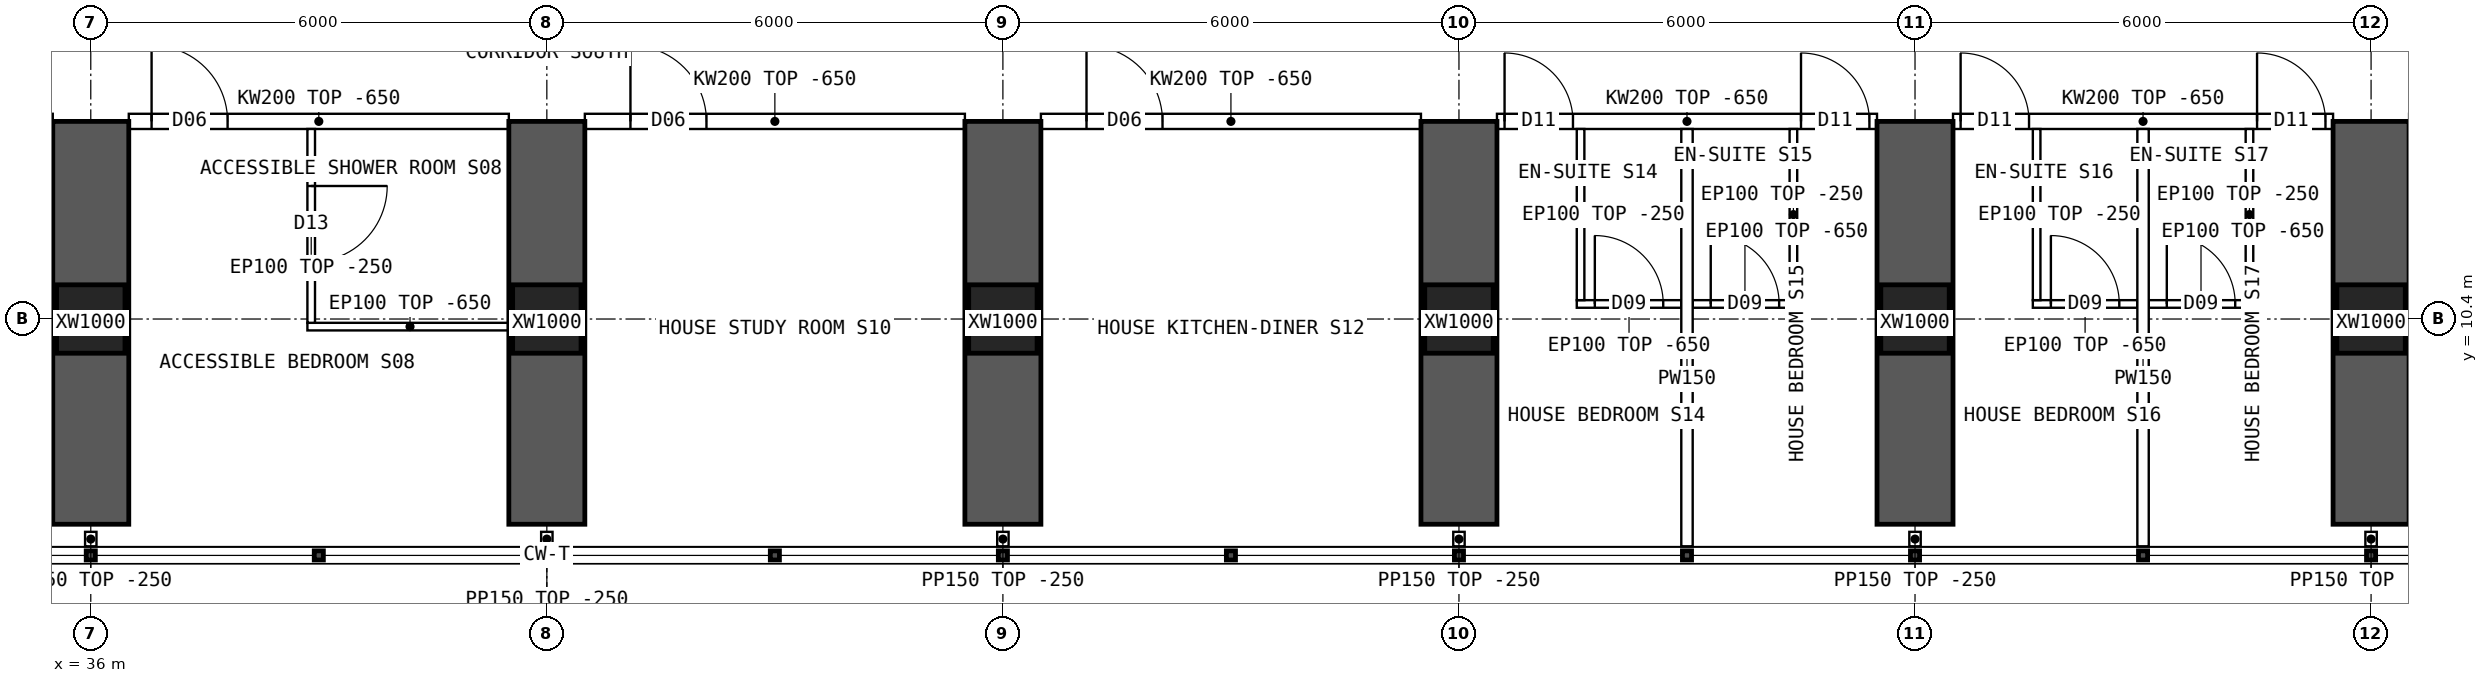
"""IFC4 building model, lengths in metres.
Left out: names, types, materials, properties, quantities, classifications, styles, units other than length and angle.
Written with IfcOpenShell. Run it as: python <this file> out.ifc"""

import sys

from ifc_helpers import new_model, si_unit, direction, frame, frame_2d, origin, origin_2d, place, context, subcontext, project, spatial, polyline, rectangle, hollow_rectangle, outline, extrude, element, fill, save


model = new_model("IFC4")
c1 = context("Model", 3, precision=1e-05, world=origin(), true_north=direction((0.0, 1.0)))
c2 = subcontext(c1, "Body", "Model", "MODEL_VIEW")
j1 = project(units=[si_unit("LENGTHUNIT", "METRE"), si_unit("PLANEANGLEUNIT", "RADIAN")], contexts=[c1])
p1 = place(None, origin())
s1 = spatial("IfcSite", under=j1, at=p1, CompositionType="ELEMENT")
p2 = place(p1, origin())
s2 = spatial("IfcBuilding", under=s1, at=p2, CompositionType="ELEMENT")
p3 = place(p2, frame((0.0, 0.0, 38.95)))
s3 = spatial("IfcBuildingStorey", under=s2, at=p3, CompositionType="ELEMENT", Elevation=38.95)
for number, where, z_axis, x_axis in (
    (1, (36.0, 10.4, 0.0), (0.0, 0.0, 1.0), (1.0, 0.0, 0.0)),
    (2, (42.0, 10.4, 0.0), (0.0, 0.0, 1.0), (1.0, 0.0, 0.0)),
    (3, (48.0, 10.4, 0.0), (0.0, 0.0, 1.0), (1.0, 0.0, 0.0)),
    (4, (54.0, 10.4, 0.0), (0.0, 0.0, 1.0), (1.0, 0.0, 0.0)),
    (5, (60.0, 10.4, 0.0), (0.0, 0.0, 1.0), (1.0, 0.0, 0.0)),
    (6, (66.0, 10.4, 0.0), (0.0, 0.0, 1.0), (1.0, 0.0, 0.0)),
):
    element("IfcColumn", number, at=place(p3, frame(where, z_axis=z_axis, x_axis=x_axis)), inside=s3, PredefinedType="COLUMN", context=c2, shape_type="SweptSolid", body=[
        extrude(hollow_rectangle(XDim=0.9, YDim=0.9, WallThickness=0.09, at=origin_2d()), origin(), (0.0, 0.0, 1.0), 3.75),
    ])
for number, where, z_axis, x_axis in (
    (7, (36.0, 7.7, 0.0), (0.0, 0.0, 1.0), (0.0, 1.0, 0.0)),
    (8, (42.0, 7.7, 0.0), (0.0, 0.0, 1.0), (0.0, 1.0, 0.0)),
    (9, (48.0, 7.7, 0.0), (0.0, 0.0, 1.0), (0.0, 1.0, 0.0)),
    (10, (54.0, 7.7, 0.0), (0.0, 0.0, 1.0), (0.0, 1.0, 0.0)),
    (11, (60.0, 7.7, 0.0), (0.0, 0.0, 1.0), (0.0, 1.0, 0.0)),
    (12, (66.0, 7.7, 0.0), (0.0, 0.0, 1.0), (0.0, 1.0, 0.0)),
):
    element("IfcWall", number, at=place(p3, frame(where, z_axis=z_axis, x_axis=x_axis)), inside=s3, PredefinedType="SHEAR", context=c2, shape_type="SweptSolid", body=[
        extrude(rectangle(XDim=5.3, YDim=1.0, at=frame_2d((2.65, 0.0))), origin(), (0.0, 0.0, 1.0), 3.75),
    ])
p4 = place(p3, frame((36.5, 13.0, 0.0), z_axis=(0.0, 0.0, 1.0), x_axis=(1.0, 0.0, 0.0)))
e13 = element("IfcWall", 13, at=p4, inside=s3, PredefinedType="SOLIDWALL", context=c2, shape_type="SweptSolid", body=[
    extrude(outline(polyline([(0.0, 0.0), (5.0, 0.0), (5.0, 3.1), (0.0, 3.1), (0.0, 0.0)])), frame((0.0, 0.1, 0.0), z_axis=(0.0, -1.0, 0.0), x_axis=(1.0, 0.0, 0.0)), (0.0, 0.0, 1.0), 0.2),
])
p5 = place(p4, frame((0.3, 0.0, 0.0)))
e14 = element("IfcOpeningElement", 14, at=p5, cuts=e13, PredefinedType="OPENING", context=c2, shape_type="SweptSolid", body=[
    extrude(rectangle(XDim=1.0, YDim=2.1, at=frame_2d((0.5, 1.05))), frame((0.0, 0.11, 0.0), z_axis=(0.0, -1.0, 0.0), x_axis=(1.0, 0.0, 0.0)), (0.0, 0.0, 1.0), 0.22),
])
p6 = place(p3, frame((42.5, 13.0, 0.0), z_axis=(0.0, 0.0, 1.0), x_axis=(1.0, 0.0, 0.0)))
e15 = element("IfcWall", 15, at=p6, inside=s3, PredefinedType="SOLIDWALL", context=c2, shape_type="SweptSolid", body=[
    extrude(outline(polyline([(0.0, 0.0), (5.0, 0.0), (5.0, 3.1), (0.0, 3.1), (0.0, 0.0)])), frame((0.0, 0.1, 0.0), z_axis=(0.0, -1.0, 0.0), x_axis=(1.0, 0.0, 0.0)), (0.0, 0.0, 1.0), 0.2),
])
p7 = place(p6, frame((0.6, 0.0, 0.0)))
e16 = element("IfcOpeningElement", 16, at=p7, cuts=e15, PredefinedType="OPENING", context=c2, shape_type="SweptSolid", body=[
    extrude(rectangle(XDim=1.0, YDim=2.1, at=frame_2d((0.5, 1.05))), frame((0.0, 0.11, 0.0), z_axis=(0.0, -1.0, 0.0), x_axis=(1.0, 0.0, 0.0)), (0.0, 0.0, 1.0), 0.22),
])
p8 = place(p3, frame((48.5, 13.0, 0.0), z_axis=(0.0, 0.0, 1.0), x_axis=(1.0, 0.0, 0.0)))
e17 = element("IfcWall", 17, at=p8, inside=s3, PredefinedType="SOLIDWALL", context=c2, shape_type="SweptSolid", body=[
    extrude(outline(polyline([(0.0, 0.0), (5.0, 0.0), (5.0, 3.1), (0.0, 3.1), (0.0, 0.0)])), frame((0.0, 0.1, 0.0), z_axis=(0.0, -1.0, 0.0), x_axis=(1.0, 0.0, 0.0)), (0.0, 0.0, 1.0), 0.2),
])
p9 = place(p8, frame((0.6, 0.0, 0.0)))
e18 = element("IfcOpeningElement", 18, at=p9, cuts=e17, PredefinedType="OPENING", context=c2, shape_type="SweptSolid", body=[
    extrude(rectangle(XDim=1.0, YDim=2.1, at=frame_2d((0.5, 1.05))), frame((0.0, 0.11, 0.0), z_axis=(0.0, -1.0, 0.0), x_axis=(1.0, 0.0, 0.0)), (0.0, 0.0, 1.0), 0.22),
])
p10 = place(p3, frame((54.5, 13.0, 0.0), z_axis=(0.0, 0.0, 1.0), x_axis=(1.0, 0.0, 0.0)))
e19 = element("IfcWall", 19, at=p10, inside=s3, PredefinedType="SOLIDWALL", context=c2, shape_type="SweptSolid", body=[
    extrude(outline(polyline([(0.0, 0.0), (5.0, 0.0), (5.0, 3.1), (0.0, 3.1), (0.0, 0.0)])), frame((0.0, 0.1, 0.0), z_axis=(0.0, -1.0, 0.0), x_axis=(1.0, 0.0, 0.0)), (0.0, 0.0, 1.0), 0.2),
])
p11 = place(p10, frame((0.1, 0.0, 0.0)))
e20 = element("IfcOpeningElement", 20, at=p11, cuts=e19, PredefinedType="OPENING", context=c2, shape_type="SweptSolid", body=[
    extrude(rectangle(XDim=0.9, YDim=2.1, at=frame_2d((0.45, 1.05))), frame((0.0, 0.11, 0.0), z_axis=(0.0, -1.0, 0.0), x_axis=(1.0, 0.0, 0.0)), (0.0, 0.0, 1.0), 0.22),
])
p12 = place(p10, frame((4.0, 0.0, 0.0)))
e21 = element("IfcOpeningElement", 21, at=p12, cuts=e19, PredefinedType="OPENING", context=c2, shape_type="SweptSolid", body=[
    extrude(rectangle(XDim=0.9, YDim=2.1, at=frame_2d((0.45, 1.05))), frame((0.0, 0.11, 0.0), z_axis=(0.0, -1.0, 0.0), x_axis=(1.0, 0.0, 0.0)), (0.0, 0.0, 1.0), 0.22),
])
p13 = place(p3, frame((60.5, 13.0, 0.0), z_axis=(0.0, 0.0, 1.0), x_axis=(1.0, 0.0, 0.0)))
e22 = element("IfcWall", 22, at=p13, inside=s3, PredefinedType="SOLIDWALL", context=c2, shape_type="SweptSolid", body=[
    extrude(outline(polyline([(0.0, 0.0), (5.0, 0.0), (5.0, 3.1), (0.0, 3.1), (0.0, 0.0)])), frame((0.0, 0.1, 0.0), z_axis=(0.0, -1.0, 0.0), x_axis=(1.0, 0.0, 0.0)), (0.0, 0.0, 1.0), 0.2),
])
p14 = place(p13, frame((0.1, 0.0, 0.0)))
e23 = element("IfcOpeningElement", 23, at=p14, cuts=e22, PredefinedType="OPENING", context=c2, shape_type="SweptSolid", body=[
    extrude(rectangle(XDim=0.9, YDim=2.1, at=frame_2d((0.45, 1.05))), frame((0.0, 0.11, 0.0), z_axis=(0.0, -1.0, 0.0), x_axis=(1.0, 0.0, 0.0)), (0.0, 0.0, 1.0), 0.22),
])
p15 = place(p13, frame((4.0, 0.0, 0.0)))
e24 = element("IfcOpeningElement", 24, at=p15, cuts=e22, PredefinedType="OPENING", context=c2, shape_type="SweptSolid", body=[
    extrude(rectangle(XDim=0.9, YDim=2.1, at=frame_2d((0.45, 1.05))), frame((0.0, 0.11, 0.0), z_axis=(0.0, -1.0, 0.0), x_axis=(1.0, 0.0, 0.0)), (0.0, 0.0, 1.0), 0.22),
])
p16 = place(p3, frame((38.85, 10.3, 0.0), z_axis=(0.0, 0.0, 1.0), x_axis=(1.0, 0.0, 0.0)))
e25 = element("IfcWall", 25, at=p16, inside=s3, PredefinedType="PARTITIONING", context=c2, shape_type="SweptSolid", body=[
    extrude(outline(polyline([(0.0, 0.0), (2.7, 0.0), (2.7, 3.1), (0.0, 3.1), (0.0, 0.0)])), frame((0.0, 0.05, 0.0), z_axis=(0.0, -1.0, 0.0), x_axis=(1.0, 0.0, 0.0)), (0.0, 0.0, 1.0), 0.1),
])
p17 = place(p3, frame((38.9, 10.35, 0.0), z_axis=(0.0, 0.0, 1.0), x_axis=(0.0, 1.0, 0.0)))
e26 = element("IfcWall", 26, at=p17, inside=s3, PredefinedType="PARTITIONING", context=c2, shape_type="SweptSolid", body=[
    extrude(outline(polyline([(0.0, 0.0), (2.55, 0.0), (2.55, 3.1), (2.502, 3.1), (2.5, 3.5), (0.252, 3.5), (0.25, 3.1), (0.0, 3.1), (0.0, 0.0)])), frame((0.0, 0.05, 0.0), z_axis=(0.0, -1.0, 0.0), x_axis=(1.0, 0.0, 0.0)), (0.0, 0.0, 1.0), 0.1),
])
p18 = place(p17, frame((0.8, 0.0, 0.0)))
e27 = element("IfcOpeningElement", 27, at=p18, cuts=e26, PredefinedType="OPENING", context=c2, shape_type="SweptSolid", body=[
    extrude(rectangle(XDim=1.0, YDim=2.1, at=frame_2d((0.5, 1.05))), frame((0.0, 0.06, 0.0), z_axis=(0.0, -1.0, 0.0), x_axis=(1.0, 0.0, 0.0)), (0.0, 0.0, 1.0), 0.12),
])
p19 = place(p3, frame((57.0, 7.41, 0.0), z_axis=(0.0, 0.0, 1.0), x_axis=(0.0, 1.0, 0.0)))
e28 = element("IfcWall", 28, at=p19, inside=s3, PredefinedType="PARTITIONING", context=c2, shape_type="SweptSolid", body=[
    extrude(outline(polyline([(0.0, 0.0), (5.49, 0.0), (5.49, 3.1), (5.442, 3.1), (5.44, 3.5), (3.192, 3.5), (3.19, 3.1), (2.792, 3.1), (2.79, 3.5), (0.0, 3.5), (0.0, 0.0)])), frame((0.0, 0.075, 0.0), z_axis=(0.0, -1.0, 0.0), x_axis=(1.0, 0.0, 0.0)), (0.0, 0.0, 1.0), 0.15),
])
p20 = place(p3, frame((56.925, 10.598, 0.0), z_axis=(0.0, 0.0, 1.0), x_axis=(-1.0, 0.0, 0.0)))
e29 = element("IfcWall", 29, at=p20, inside=s3, PredefinedType="PARTITIONING", context=c2, shape_type="SweptSolid", body=[
    extrude(outline(polyline([(0.0, 0.0), (1.375, 0.0), (1.375, 3.1), (0.0, 3.1), (0.0, 0.0)])), frame((0.0, 0.05, 0.0), z_axis=(0.0, -1.0, 0.0), x_axis=(1.0, 0.0, 0.0)), (0.0, 0.0, 1.0), 0.1),
])
p21 = place(p20, frame((0.238, 0.0, 0.0)))
e30 = element("IfcOpeningElement", 30, at=p21, cuts=e29, PredefinedType="OPENING", context=c2, shape_type="SweptSolid", body=[
    extrude(rectangle(XDim=0.9, YDim=2.1, at=frame_2d((0.45, 1.05))), frame((0.0, 0.06, 0.0), z_axis=(0.0, -1.0, 0.0), x_axis=(1.0, 0.0, 0.0)), (0.0, 0.0, 1.0), 0.12),
])
p22 = place(p3, frame((55.6, 10.648, 0.0), z_axis=(0.0, 0.0, 1.0), x_axis=(0.0, 1.0, 0.0)))
e31 = element("IfcWall", 31, at=p22, inside=s3, PredefinedType="PARTITIONING", context=c2, shape_type="SweptSolid", body=[
    extrude(outline(polyline([(0.0, 0.0), (2.252, 0.0), (2.252, 3.1), (2.204, 3.1), (2.202, 3.5), (0.0, 3.5), (0.0, 0.0)])), frame((0.0, 0.05, 0.0), z_axis=(0.0, -1.0, 0.0), x_axis=(1.0, 0.0, 0.0)), (0.0, 0.0, 1.0), 0.1),
])
p23 = place(p3, frame((58.45, 10.598, 0.0), z_axis=(0.0, 0.0, 1.0), x_axis=(-1.0, 0.0, 0.0)))
e32 = element("IfcWall", 32, at=p23, inside=s3, PredefinedType="PARTITIONING", context=c2, shape_type="SweptSolid", body=[
    extrude(outline(polyline([(0.0, 0.0), (1.375, 0.0), (1.375, 3.1), (0.0, 3.1), (0.0, 0.0)])), frame((0.0, 0.05, 0.0), z_axis=(0.0, -1.0, 0.0), x_axis=(1.0, 0.0, 0.0)), (0.0, 0.0, 1.0), 0.1),
])
p24 = place(p23, frame((0.238, 0.0, 0.0)))
e33 = element("IfcOpeningElement", 33, at=p24, cuts=e32, PredefinedType="OPENING", context=c2, shape_type="SweptSolid", body=[
    extrude(rectangle(XDim=0.9, YDim=2.1, at=frame_2d((0.45, 1.05))), frame((0.0, 0.06, 0.0), z_axis=(0.0, -1.0, 0.0), x_axis=(1.0, 0.0, 0.0)), (0.0, 0.0, 1.0), 0.12),
])
p25 = place(p3, frame((58.4, 10.648, 0.0), z_axis=(0.0, 0.0, 1.0), x_axis=(0.0, 1.0, 0.0)))
e34 = element("IfcWall", 34, at=p25, inside=s3, PredefinedType="PARTITIONING", context=c2, shape_type="SweptSolid", body=[
    extrude(outline(polyline([(0.0, 0.0), (2.252, 0.0), (2.252, 3.1), (2.204, 3.1), (2.202, 3.5), (0.0, 3.5), (0.0, 0.0)])), frame((0.0, 0.05, 0.0), z_axis=(0.0, -1.0, 0.0), x_axis=(1.0, 0.0, 0.0)), (0.0, 0.0, 1.0), 0.1),
])
p26 = place(p3, frame((63.0, 7.41, 0.0), z_axis=(0.0, 0.0, 1.0), x_axis=(0.0, 1.0, 0.0)))
e35 = element("IfcWall", 35, at=p26, inside=s3, PredefinedType="PARTITIONING", context=c2, shape_type="SweptSolid", body=[
    extrude(outline(polyline([(0.0, 0.0), (5.49, 0.0), (5.49, 3.1), (5.442, 3.1), (5.44, 3.5), (3.192, 3.5), (3.19, 3.1), (2.792, 3.1), (2.79, 3.5), (0.0, 3.5), (0.0, 0.0)])), frame((0.0, 0.075, 0.0), z_axis=(0.0, -1.0, 0.0), x_axis=(1.0, 0.0, 0.0)), (0.0, 0.0, 1.0), 0.15),
])
p27 = place(p3, frame((62.925, 10.598, 0.0), z_axis=(0.0, 0.0, 1.0), x_axis=(-1.0, 0.0, 0.0)))
e36 = element("IfcWall", 36, at=p27, inside=s3, PredefinedType="PARTITIONING", context=c2, shape_type="SweptSolid", body=[
    extrude(outline(polyline([(0.0, 0.0), (1.375, 0.0), (1.375, 3.1), (0.0, 3.1), (0.0, 0.0)])), frame((0.0, 0.05, 0.0), z_axis=(0.0, -1.0, 0.0), x_axis=(1.0, 0.0, 0.0)), (0.0, 0.0, 1.0), 0.1),
])
p28 = place(p27, frame((0.238, 0.0, 0.0)))
e37 = element("IfcOpeningElement", 37, at=p28, cuts=e36, PredefinedType="OPENING", context=c2, shape_type="SweptSolid", body=[
    extrude(rectangle(XDim=0.9, YDim=2.1, at=frame_2d((0.45, 1.05))), frame((0.0, 0.06, 0.0), z_axis=(0.0, -1.0, 0.0), x_axis=(1.0, 0.0, 0.0)), (0.0, 0.0, 1.0), 0.12),
])
p29 = place(p3, frame((61.6, 10.648, 0.0), z_axis=(0.0, 0.0, 1.0), x_axis=(0.0, 1.0, 0.0)))
e38 = element("IfcWall", 38, at=p29, inside=s3, PredefinedType="PARTITIONING", context=c2, shape_type="SweptSolid", body=[
    extrude(outline(polyline([(0.0, 0.0), (2.252, 0.0), (2.252, 3.1), (2.204, 3.1), (2.202, 3.5), (0.0, 3.5), (0.0, 0.0)])), frame((0.0, 0.05, 0.0), z_axis=(0.0, -1.0, 0.0), x_axis=(1.0, 0.0, 0.0)), (0.0, 0.0, 1.0), 0.1),
])
p30 = place(p3, frame((64.45, 10.598, 0.0), z_axis=(0.0, 0.0, 1.0), x_axis=(-1.0, 0.0, 0.0)))
e39 = element("IfcWall", 39, at=p30, inside=s3, PredefinedType="PARTITIONING", context=c2, shape_type="SweptSolid", body=[
    extrude(outline(polyline([(0.0, 0.0), (1.375, 0.0), (1.375, 3.1), (0.0, 3.1), (0.0, 0.0)])), frame((0.0, 0.05, 0.0), z_axis=(0.0, -1.0, 0.0), x_axis=(1.0, 0.0, 0.0)), (0.0, 0.0, 1.0), 0.1),
])
p31 = place(p30, frame((0.238, 0.0, 0.0)))
e40 = element("IfcOpeningElement", 40, at=p31, cuts=e39, PredefinedType="OPENING", context=c2, shape_type="SweptSolid", body=[
    extrude(rectangle(XDim=0.9, YDim=2.1, at=frame_2d((0.45, 1.05))), frame((0.0, 0.06, 0.0), z_axis=(0.0, -1.0, 0.0), x_axis=(1.0, 0.0, 0.0)), (0.0, 0.0, 1.0), 0.12),
])
p32 = place(p3, frame((64.4, 10.648, 0.0), z_axis=(0.0, 0.0, 1.0), x_axis=(0.0, 1.0, 0.0)))
e41 = element("IfcWall", 41, at=p32, inside=s3, PredefinedType="PARTITIONING", context=c2, shape_type="SweptSolid", body=[
    extrude(outline(polyline([(0.0, 0.0), (2.252, 0.0), (2.252, 3.1), (2.204, 3.1), (2.202, 3.5), (0.0, 3.5), (0.0, 0.0)])), frame((0.0, 0.05, 0.0), z_axis=(0.0, -1.0, 0.0), x_axis=(1.0, 0.0, 0.0)), (0.0, 0.0, 1.0), 0.1),
])
for number, where, z_axis, x_axis in (
    (42, (36.0, 7.6, 0.0), (0.0, 0.0, 1.0), (0.0, -1.0, 0.0)),
    (43, (42.0, 7.6, 0.0), (0.0, 0.0, 1.0), (0.0, -1.0, 0.0)),
    (44, (48.0, 7.6, 0.0), (0.0, 0.0, 1.0), (0.0, -1.0, 0.0)),
    (45, (54.0, 7.6, 0.0), (0.0, 0.0, 1.0), (0.0, -1.0, 0.0)),
    (46, (60.0, 7.6, 0.0), (0.0, 0.0, 1.0), (0.0, -1.0, 0.0)),
    (47, (66.0, 7.6, 0.0), (0.0, 0.0, 1.0), (0.0, -1.0, 0.0)),
):
    element("IfcWall", number, at=place(p3, frame(where, z_axis=z_axis, x_axis=x_axis)), inside=s3, PredefinedType="PARTITIONING", context=c2, shape_type="SweptSolid", body=[
        extrude(rectangle(XDim=0.19, YDim=0.15, at=frame_2d((0.095, 0.0))), origin(), (0.0, 0.0, 1.0), 3.5),
    ])
p33 = place(p18, origin())
e48 = element("IfcDoor", 48, at=p33, inside=s3, OperationType="SINGLE_SWING_RIGHT", PredefinedType="DOOR", context=c2, shape_type="SweptSolid", body=[
    extrude(rectangle(XDim=1.0, YDim=2.1, at=frame_2d((0.5, 1.05))), frame((0.0, 0.025, 0.0), z_axis=(0.0, -1.0, 0.0), x_axis=(1.0, 0.0, 0.0)), (0.0, 0.0, 1.0), 0.05),
])
fill(e27, e48)
p34 = place(p5, origin())
e49 = element("IfcDoor", 49, at=p34, inside=s3, OperationType="SINGLE_SWING_LEFT", PredefinedType="DOOR", context=c2, shape_type="SweptSolid", body=[
    extrude(rectangle(XDim=1.0, YDim=2.1, at=frame_2d((0.5, 1.05))), frame((0.0, 0.025, 0.0), z_axis=(0.0, -1.0, 0.0), x_axis=(1.0, 0.0, 0.0)), (0.0, 0.0, 1.0), 0.05),
])
fill(e14, e49)
p35 = place(p7, origin())
e50 = element("IfcDoor", 50, at=p35, inside=s3, OperationType="SINGLE_SWING_LEFT", PredefinedType="DOOR", context=c2, shape_type="SweptSolid", body=[
    extrude(rectangle(XDim=1.0, YDim=2.1, at=frame_2d((0.5, 1.05))), frame((0.0, 0.025, 0.0), z_axis=(0.0, -1.0, 0.0), x_axis=(1.0, 0.0, 0.0)), (0.0, 0.0, 1.0), 0.05),
])
fill(e16, e50)
p36 = place(p9, origin())
e51 = element("IfcDoor", 51, at=p36, inside=s3, OperationType="SINGLE_SWING_LEFT", PredefinedType="DOOR", context=c2, shape_type="SweptSolid", body=[
    extrude(rectangle(XDim=1.0, YDim=2.1, at=frame_2d((0.5, 1.05))), frame((0.0, 0.025, 0.0), z_axis=(0.0, -1.0, 0.0), x_axis=(1.0, 0.0, 0.0)), (0.0, 0.0, 1.0), 0.05),
])
fill(e18, e51)
p37 = place(p21, origin())
e52 = element("IfcDoor", 52, at=p37, inside=s3, OperationType="SINGLE_SWING_RIGHT", PredefinedType="DOOR", context=c2, shape_type="SweptSolid", body=[
    extrude(rectangle(XDim=0.9, YDim=2.1, at=frame_2d((0.45, 1.05))), frame((0.0, 0.025, 0.0), z_axis=(0.0, -1.0, 0.0), x_axis=(1.0, 0.0, 0.0)), (0.0, 0.0, 1.0), 0.05),
])
fill(e30, e52)
p38 = place(p11, origin())
e53 = element("IfcDoor", 53, at=p38, inside=s3, OperationType="SINGLE_SWING_LEFT", PredefinedType="DOOR", context=c2, shape_type="SweptSolid", body=[
    extrude(rectangle(XDim=0.9, YDim=2.1, at=frame_2d((0.45, 1.05))), frame((0.0, 0.025, 0.0), z_axis=(0.0, -1.0, 0.0), x_axis=(1.0, 0.0, 0.0)), (0.0, 0.0, 1.0), 0.05),
])
fill(e20, e53)
p39 = place(p24, origin())
e54 = element("IfcDoor", 54, at=p39, inside=s3, OperationType="SINGLE_SWING_RIGHT", PredefinedType="DOOR", context=c2, shape_type="SweptSolid", body=[
    extrude(rectangle(XDim=0.9, YDim=2.1, at=frame_2d((0.45, 1.05))), frame((0.0, 0.025, 0.0), z_axis=(0.0, -1.0, 0.0), x_axis=(1.0, 0.0, 0.0)), (0.0, 0.0, 1.0), 0.05),
])
fill(e33, e54)
p40 = place(p12, origin())
e55 = element("IfcDoor", 55, at=p40, inside=s3, OperationType="SINGLE_SWING_LEFT", PredefinedType="DOOR", context=c2, shape_type="SweptSolid", body=[
    extrude(rectangle(XDim=0.9, YDim=2.1, at=frame_2d((0.45, 1.05))), frame((0.0, 0.025, 0.0), z_axis=(0.0, -1.0, 0.0), x_axis=(1.0, 0.0, 0.0)), (0.0, 0.0, 1.0), 0.05),
])
fill(e21, e55)
p41 = place(p28, origin())
e56 = element("IfcDoor", 56, at=p41, inside=s3, OperationType="SINGLE_SWING_RIGHT", PredefinedType="DOOR", context=c2, shape_type="SweptSolid", body=[
    extrude(rectangle(XDim=0.9, YDim=2.1, at=frame_2d((0.45, 1.05))), frame((0.0, 0.025, 0.0), z_axis=(0.0, -1.0, 0.0), x_axis=(1.0, 0.0, 0.0)), (0.0, 0.0, 1.0), 0.05),
])
fill(e37, e56)
p42 = place(p14, origin())
e57 = element("IfcDoor", 57, at=p42, inside=s3, OperationType="SINGLE_SWING_LEFT", PredefinedType="DOOR", context=c2, shape_type="SweptSolid", body=[
    extrude(rectangle(XDim=0.9, YDim=2.1, at=frame_2d((0.45, 1.05))), frame((0.0, 0.025, 0.0), z_axis=(0.0, -1.0, 0.0), x_axis=(1.0, 0.0, 0.0)), (0.0, 0.0, 1.0), 0.05),
])
fill(e23, e57)
p43 = place(p31, origin())
e58 = element("IfcDoor", 58, at=p43, inside=s3, OperationType="SINGLE_SWING_RIGHT", PredefinedType="DOOR", context=c2, shape_type="SweptSolid", body=[
    extrude(rectangle(XDim=0.9, YDim=2.1, at=frame_2d((0.45, 1.05))), frame((0.0, 0.025, 0.0), z_axis=(0.0, -1.0, 0.0), x_axis=(1.0, 0.0, 0.0)), (0.0, 0.0, 1.0), 0.05),
])
fill(e40, e58)
p44 = place(p15, origin())
e59 = element("IfcDoor", 59, at=p44, inside=s3, OperationType="SINGLE_SWING_LEFT", PredefinedType="DOOR", context=c2, shape_type="SweptSolid", body=[
    extrude(rectangle(XDim=0.9, YDim=2.1, at=frame_2d((0.45, 1.05))), frame((0.0, 0.025, 0.0), z_axis=(0.0, -1.0, 0.0), x_axis=(1.0, 0.0, 0.0)), (0.0, 0.0, 1.0), 0.05),
])
fill(e24, e59)
save(model, sys.argv[1])
